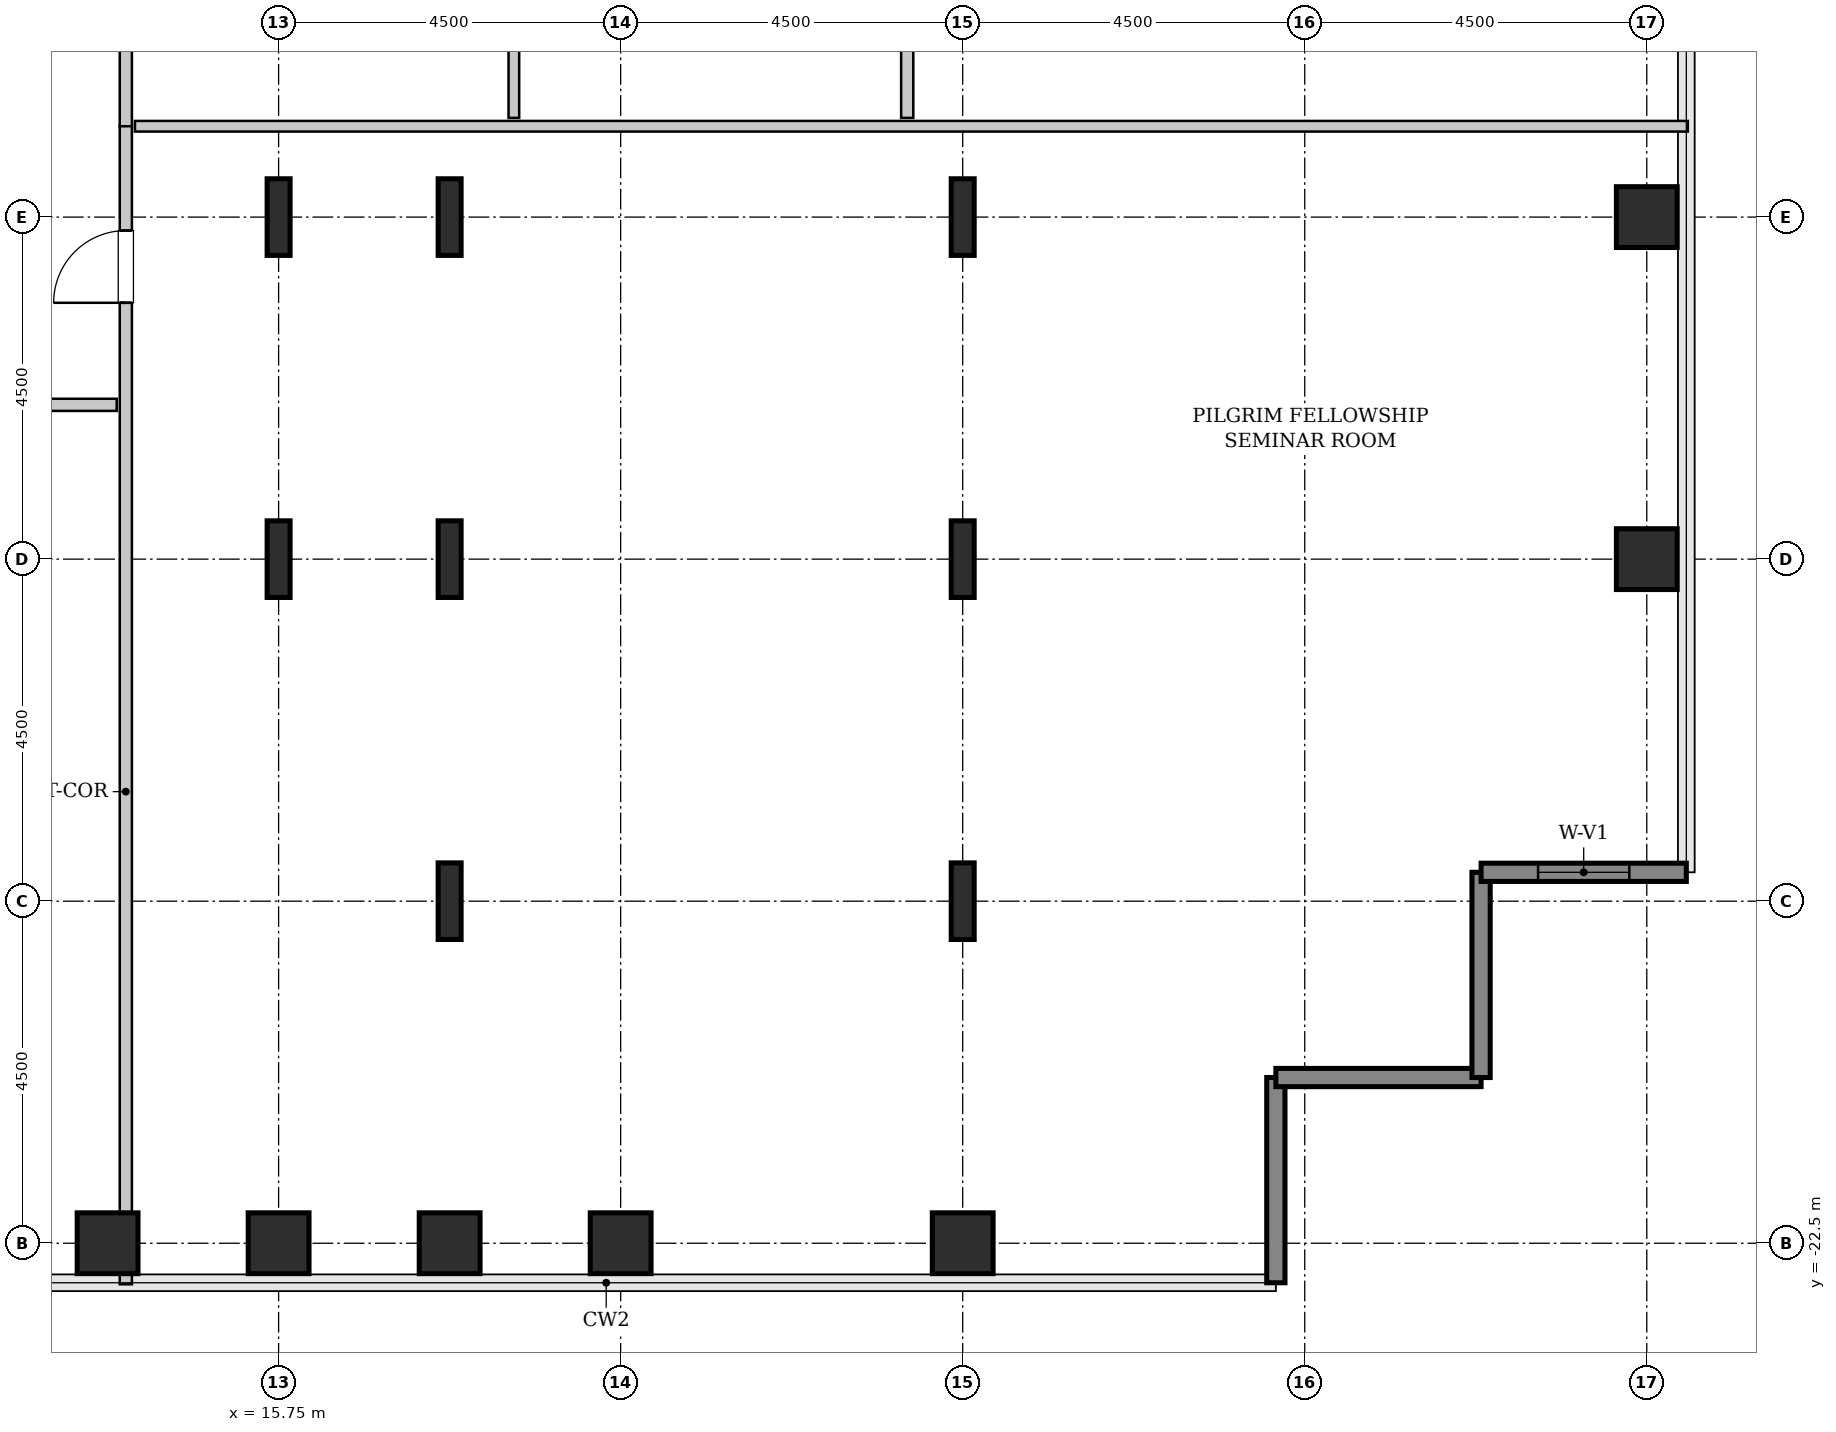
"""IFC4 building model, lengths in metres.
Left out: names, types, materials, properties, quantities, classifications, styles, units other than length and angle.
Written with IfcOpenShell. Run it as: python <this file> out.ifc"""

import sys

from ifc_helpers import new_model, si_unit, direction, frame, frame_2d, origin, origin_2d, place, context, subcontext, project, spatial, rectangle, hollow_rectangle, i_section, extrude, source, transform, mapped, element, fill, save


model = new_model("IFC4")
c1 = context("Model", 3, precision=1e-05, world=origin(), true_north=direction((0.0, 1.0)))
c2 = subcontext(c1, "Body", "Model", "MODEL_VIEW")
j1 = project(units=[si_unit("LENGTHUNIT", "METRE"), si_unit("PLANEANGLEUNIT", "RADIAN")], contexts=[c1])
p1 = place(None, origin())
s1 = spatial("IfcSite", under=j1, at=p1, CompositionType="ELEMENT")
p2 = place(p1, origin())
s2 = spatial("IfcBuilding", under=s1, at=p2, CompositionType="ELEMENT")
p3 = place(p2, frame((0.0, 0.0, 121.2)))
s3 = spatial("IfcBuildingStorey", under=s2, at=p3, CompositionType="ELEMENT", Elevation=121.2)
m1 = source(origin(), c2, "Body", "SweptSolid", [
    extrude(hollow_rectangle(XDim=0.8, YDim=0.8, WallThickness=0.04, InnerFilletRadius=0.04, OuterFilletRadius=0.08, at=origin_2d()), origin(), (0.0, 0.0, 1.0), 3.8),
])
for number, where, z_axis, x_axis in (
    (1, (13.5, -22.5, 0.0), (0.0, 0.0, 1.0), (1.0, 0.0, 0.0)),
    (2, (15.75, -22.5, 0.0), (0.0, 0.0, 1.0), (1.0, 0.0, 0.0)),
):
    element("IfcColumn", number, at=place(p3, frame(where, z_axis=z_axis, x_axis=x_axis)), inside=s3, PredefinedType="COLUMN", context=c2, shape_type="MappedRepresentation", body=[
        mapped(m1, transform((0.0, 0.0, 0.0), x_axis=(1.0, 0.0, 0.0), y_axis=(0.0, 1.0, 0.0), z_axis=(0.0, 0.0, 1.0), scale=1.0)),
    ])
m2 = source(origin(), c2, "Body", "SweptSolid", [
    extrude(i_section(OverallWidth=0.302, OverallDepth=1.008, WebThickness=0.021, FlangeThickness=0.04, FilletRadius=0.03, at=origin_2d()), origin(), (0.0, 0.0, 1.0), 3.8),
])
for number, where, z_axis, x_axis in (
    (3, (15.75, -13.5, 0.0), (0.0, 0.0, 1.0), (1.0, 0.0, 0.0)),
    (4, (15.75, -9.0, 0.0), (0.0, 0.0, 1.0), (1.0, 0.0, 0.0)),
):
    element("IfcColumn", number, at=place(p3, frame(where, z_axis=z_axis, x_axis=x_axis)), inside=s3, PredefinedType="COLUMN", context=c2, shape_type="MappedRepresentation", body=[
        mapped(m2, transform((0.0, 0.0, 0.0), x_axis=(1.0, 0.0, 0.0), y_axis=(0.0, 1.0, 0.0), z_axis=(0.0, 0.0, 1.0), scale=1.0)),
    ])
p4 = place(p3, frame((18.0, -22.5, 0.0), z_axis=(0.0, 0.0, 1.0), x_axis=(1.0, 0.0, 0.0)))
e5 = element("IfcColumn", 5, at=p4, inside=s3, PredefinedType="COLUMN", context=c2, shape_type="MappedRepresentation", body=[
    mapped(m1, transform((0.0, 0.0, 0.0), x_axis=(1.0, 0.0, 0.0), y_axis=(0.0, 1.0, 0.0), z_axis=(0.0, 0.0, 1.0), scale=1.0)),
])
for number, where, z_axis, x_axis in (
    (6, (18.0, -18.0, 0.0), (0.0, 0.0, 1.0), (1.0, 0.0, 0.0)),
    (7, (18.0, -13.5, 0.0), (0.0, 0.0, 1.0), (1.0, 0.0, 0.0)),
    (8, (18.0, -9.0, 0.0), (0.0, 0.0, 1.0), (1.0, 0.0, 0.0)),
):
    element("IfcColumn", number, at=place(p3, frame(where, z_axis=z_axis, x_axis=x_axis)), inside=s3, PredefinedType="COLUMN", context=c2, shape_type="MappedRepresentation", body=[
        mapped(m2, transform((0.0, 0.0, 0.0), x_axis=(1.0, 0.0, 0.0), y_axis=(0.0, 1.0, 0.0), z_axis=(0.0, 0.0, 1.0), scale=1.0)),
    ])
for number, where, z_axis, x_axis in (
    (9, (20.25, -22.5, 0.0), (0.0, 0.0, 1.0), (1.0, 0.0, 0.0)),
    (10, (24.75, -22.5, 0.0), (0.0, 0.0, 1.0), (1.0, 0.0, 0.0)),
):
    element("IfcColumn", number, at=place(p3, frame(where, z_axis=z_axis, x_axis=x_axis)), inside=s3, PredefinedType="COLUMN", context=c2, shape_type="MappedRepresentation", body=[
        mapped(m1, transform((0.0, 0.0, 0.0), x_axis=(1.0, 0.0, 0.0), y_axis=(0.0, 1.0, 0.0), z_axis=(0.0, 0.0, 1.0), scale=1.0)),
    ])
for number, where, z_axis, x_axis in (
    (11, (24.75, -18.0, 0.0), (0.0, 0.0, 1.0), (1.0, 0.0, 0.0)),
    (12, (24.75, -13.5, 0.0), (0.0, 0.0, 1.0), (1.0, 0.0, 0.0)),
    (13, (24.75, -9.0, 0.0), (0.0, 0.0, 1.0), (1.0, 0.0, 0.0)),
):
    element("IfcColumn", number, at=place(p3, frame(where, z_axis=z_axis, x_axis=x_axis)), inside=s3, PredefinedType="COLUMN", context=c2, shape_type="MappedRepresentation", body=[
        mapped(m2, transform((0.0, 0.0, 0.0), x_axis=(1.0, 0.0, 0.0), y_axis=(0.0, 1.0, 0.0), z_axis=(0.0, 0.0, 1.0), scale=1.0)),
    ])
for number, where, z_axis, x_axis in (
    (14, (33.75, -13.5, 0.0), (0.0, 0.0, 1.0), (1.0, 0.0, 0.0)),
    (15, (33.75, -9.0, 0.0), (0.0, 0.0, 1.0), (1.0, 0.0, 0.0)),
):
    element("IfcColumn", number, at=place(p3, frame(where, z_axis=z_axis, x_axis=x_axis)), inside=s3, PredefinedType="COLUMN", context=c2, shape_type="MappedRepresentation", body=[
        mapped(m1, transform((0.0, 0.0, 0.0), x_axis=(1.0, 0.0, 0.0), y_axis=(0.0, 1.0, 0.0), z_axis=(0.0, 0.0, 1.0), scale=1.0)),
    ])
m3 = source(origin(), c2, "Body", "SweptSolid", [
    extrude(rectangle(XDim=2.7, YDim=0.24, at=frame_2d((1.35, 0.0))), origin(), (0.0, 0.0, 1.0), 3.55),
])
for number, where, z_axis, x_axis in (
    (16, (28.87, -23.02, 0.0), (0.0, 0.0, 1.0), (0.0, 1.0, 0.0)),
    (17, (28.87, -20.32, 0.0), (0.0, 0.0, 1.0), (1.0, 0.0, 0.0)),
    (18, (31.57, -20.32, 0.0), (0.0, 0.0, 1.0), (0.0, 1.0, 0.0)),
):
    element("IfcWall", number, at=place(p3, frame(where, z_axis=z_axis, x_axis=x_axis)), inside=s3, PredefinedType="SHEAR", context=c2, shape_type="MappedRepresentation", body=[
        mapped(m3, transform((0.0, 0.0, 0.0), x_axis=(1.0, 0.0, 0.0), y_axis=(0.0, 1.0, 0.0), z_axis=(0.0, 0.0, 1.0), scale=1.0)),
    ])
p5 = place(p3, frame((31.57, -17.62, 0.0), z_axis=(0.0, 0.0, 1.0), x_axis=(1.0, 0.0, 0.0)))
e19 = element("IfcWall", 19, at=p5, inside=s3, PredefinedType="SHEAR", context=c2, shape_type="MappedRepresentation", body=[
    mapped(m3, transform((0.0, 0.0, 0.0), x_axis=(1.0, 0.0, 0.0), y_axis=(0.0, 1.0, 0.0), z_axis=(0.0, 0.0, 1.0), scale=1.0)),
])
p6 = place(p5, frame((0.75, 0.0, 0.85)))
e20 = element("IfcOpeningElement", 20, at=p6, cuts=e19, PredefinedType="OPENING", context=c2, shape_type="SweptSolid", body=[
    extrude(rectangle(XDim=1.2, YDim=1.8, at=frame_2d((0.6, 0.9))), frame((0.0, 0.13, 0.0), z_axis=(0.0, -1.0, 0.0), x_axis=(1.0, 0.0, 0.0)), (0.0, 0.0, 1.0), 0.26),
])
m4 = source(origin(), c2, "Body", "SweptSolid", [
    extrude(rectangle(XDim=15.245, YDim=0.16, at=frame_2d((7.623, 0.0))), origin(), (0.0, 0.0, 1.0), 3.535),
])
p7 = place(p3, frame((13.74, -23.04, 0.0), z_axis=(0.0, 0.0, 1.0), x_axis=(0.0, 1.0, 0.0)))
e21 = element("IfcWall", 21, at=p7, inside=s3, PredefinedType="PARTITIONING", context=c2, shape_type="MappedRepresentation", body=[
    mapped(m4, transform((0.0, 0.0, 0.0), x_axis=(1.0, 0.0, 0.0), y_axis=(0.0, 1.0, 0.0), z_axis=(0.0, 0.0, 1.0), scale=1.0)),
])
p8 = place(p7, frame((12.913, 0.0, 0.0)))
e22 = element("IfcOpeningElement", 22, at=p8, cuts=e21, PredefinedType="OPENING", context=c2, shape_type="SweptSolid", body=[
    extrude(rectangle(XDim=0.95, YDim=2.1, at=frame_2d((0.475, 1.05))), frame((0.0, 0.09, 0.0), z_axis=(0.0, -1.0, 0.0), x_axis=(1.0, 0.0, 0.0)), (0.0, 0.0, 1.0), 0.18),
])
m5 = source(origin(), c2, "Body", "SweptSolid", [
    extrude(rectangle(XDim=20.43, YDim=0.14, at=frame_2d((10.215, 0.0))), origin(), (0.0, 0.0, 1.0), 3.535),
])
p9 = place(p3, frame((13.86, -7.805, 0.0), z_axis=(0.0, 0.0, 1.0), x_axis=(1.0, 0.0, 0.0)))
e23 = element("IfcWall", 23, at=p9, inside=s3, PredefinedType="PARTITIONING", context=c2, shape_type="MappedRepresentation", body=[
    mapped(m5, transform((0.0, 0.0, 0.0), x_axis=(1.0, 0.0, 0.0), y_axis=(0.0, 1.0, 0.0), z_axis=(0.0, 0.0, 1.0), scale=1.0)),
])
m6 = source(origin(), c2, "Body", "SweptSolid", [
    extrude(rectangle(XDim=15.5, YDim=0.16, at=frame_2d((7.75, 0.0))), origin(), (0.0, 0.0, 1.0), 3.535),
])
p10 = place(p3, frame((24.02, -7.695, 0.0), z_axis=(0.0, 0.0, 1.0), x_axis=(0.0, 1.0, 0.0)))
e24 = element("IfcWall", 24, at=p10, inside=s3, PredefinedType="PARTITIONING", context=c2, shape_type="MappedRepresentation", body=[
    mapped(m6, transform((0.0, 0.0, 0.0), x_axis=(1.0, 0.0, 0.0), y_axis=(0.0, 1.0, 0.0), z_axis=(0.0, 0.0, 1.0), scale=1.0)),
])
p11 = place(p10, frame((9.47, 0.0, 0.0)))
e25 = element("IfcOpeningElement", 25, at=p11, cuts=e24, PredefinedType="OPENING", context=c2, shape_type="SweptSolid", body=[
    extrude(rectangle(XDim=0.95, YDim=2.1, at=frame_2d((0.475, 1.05))), frame((0.0, 0.09, 0.0), z_axis=(0.0, -1.0, 0.0), x_axis=(1.0, 0.0, 0.0)), (0.0, 0.0, 1.0), 0.18),
])
m7 = source(origin(), c2, "Body", "SweptSolid", [
    extrude(rectangle(XDim=9.195, YDim=0.16, at=frame_2d((4.597, 0.0))), origin(), (0.0, 0.0, 1.0), 3.535),
])
p12 = place(p3, frame((13.74, -7.805, 0.0), z_axis=(0.0, 0.0, 1.0), x_axis=(0.0, 1.0, 0.0)))
e26 = element("IfcWall", 26, at=p12, inside=s3, PredefinedType="PARTITIONING", context=c2, shape_type="MappedRepresentation", body=[
    mapped(m7, transform((0.0, 0.0, 0.0), x_axis=(1.0, 0.0, 0.0), y_axis=(0.0, 1.0, 0.0), z_axis=(0.0, 0.0, 1.0), scale=1.0)),
])
p13 = place(p12, frame((4.123, 0.0, 0.0)))
e27 = element("IfcOpeningElement", 27, at=p13, cuts=e26, PredefinedType="OPENING", context=c2, shape_type="SweptSolid", body=[
    extrude(rectangle(XDim=0.95, YDim=2.1, at=frame_2d((0.475, 1.05))), frame((0.0, 0.09, 0.0), z_axis=(0.0, -1.0, 0.0), x_axis=(1.0, 0.0, 0.0)), (0.0, 0.0, 1.0), 0.18),
])
m8 = source(origin(), c2, "Body", "SweptSolid", [
    extrude(rectangle(XDim=8.965, YDim=0.14, at=frame_2d((4.482, 0.0))), origin(), (0.0, 0.0, 1.0), 3.535),
])
p14 = place(p3, frame((18.845, -7.695, 0.0), z_axis=(0.0, 0.0, 1.0), x_axis=(0.0, 1.0, 0.0)))
e28 = element("IfcWall", 28, at=p14, inside=s3, PredefinedType="PARTITIONING", context=c2, shape_type="MappedRepresentation", body=[
    mapped(m8, transform((0.0, 0.0, 0.0), x_axis=(1.0, 0.0, 0.0), y_axis=(0.0, 1.0, 0.0), z_axis=(0.0, 0.0, 1.0), scale=1.0)),
])
m9 = source(origin(), c2, "Body", "SweptSolid", [
    extrude(rectangle(XDim=5.225, YDim=0.16, at=frame_2d((2.613, 0.0))), origin(), (0.0, 0.0, 1.0), 3.535),
])
p15 = place(p3, frame((8.395, -11.47, 0.0), z_axis=(0.0, 0.0, 1.0), x_axis=(1.0, 0.0, 0.0)))
e29 = element("IfcWall", 29, at=p15, inside=s3, PredefinedType="PARTITIONING", context=c2, shape_type="MappedRepresentation", body=[
    mapped(m9, transform((0.0, 0.0, 0.0), x_axis=(1.0, 0.0, 0.0), y_axis=(0.0, 1.0, 0.0), z_axis=(0.0, 0.0, 1.0), scale=1.0)),
])
p16 = place(p15, frame((2.137, 0.0, 0.0)))
e30 = element("IfcOpeningElement", 30, at=p16, cuts=e29, PredefinedType="OPENING", context=c2, shape_type="SweptSolid", body=[
    extrude(rectangle(XDim=0.95, YDim=2.1, at=frame_2d((0.475, 1.05))), frame((0.0, 0.09, 0.0), z_axis=(0.0, -1.0, 0.0), x_axis=(1.0, 0.0, 0.0)), (0.0, 0.0, 1.0), 0.18),
])
m10 = source(origin(), c2, "Body", "SweptSolid", [
    extrude(rectangle(XDim=1.2, YDim=1.8, at=frame_2d((0.6, 0.9))), frame((0.0, 0.03, 0.0), z_axis=(0.0, -1.0, 0.0), x_axis=(1.0, 0.0, 0.0)), (0.0, 0.0, 1.0), 0.06),
])
p17 = place(p6, origin())
e31 = element("IfcWindow", 31, at=p17, inside=s3, PartitioningType="SINGLE_PANEL", PredefinedType="WINDOW", context=c2, shape_type="MappedRepresentation", body=[
    mapped(m10, transform((0.0, 0.0, 0.0), x_axis=(1.0, 0.0, 0.0), y_axis=(0.0, 1.0, 0.0), z_axis=(0.0, 0.0, 1.0), scale=1.0)),
])
fill(e20, e31)
m11 = source(origin(), c2, "Body", "SweptSolid", [
    extrude(rectangle(XDim=0.95, YDim=2.1, at=frame_2d((0.475, 1.05))), frame((0.0, 0.025, 0.0), z_axis=(0.0, -1.0, 0.0), x_axis=(1.0, 0.0, 0.0)), (0.0, 0.0, 1.0), 0.05),
])
p18 = place(p8, origin())
e32 = element("IfcDoor", 32, at=p18, inside=s3, OperationType="SINGLE_SWING_LEFT", PredefinedType="DOOR", context=c2, shape_type="MappedRepresentation", body=[
    mapped(m11, transform((0.0, 0.0, 0.0), x_axis=(1.0, 0.0, 0.0), y_axis=(0.0, 1.0, 0.0), z_axis=(0.0, 0.0, 1.0), scale=1.0)),
])
fill(e22, e32)
save(model, sys.argv[1])
